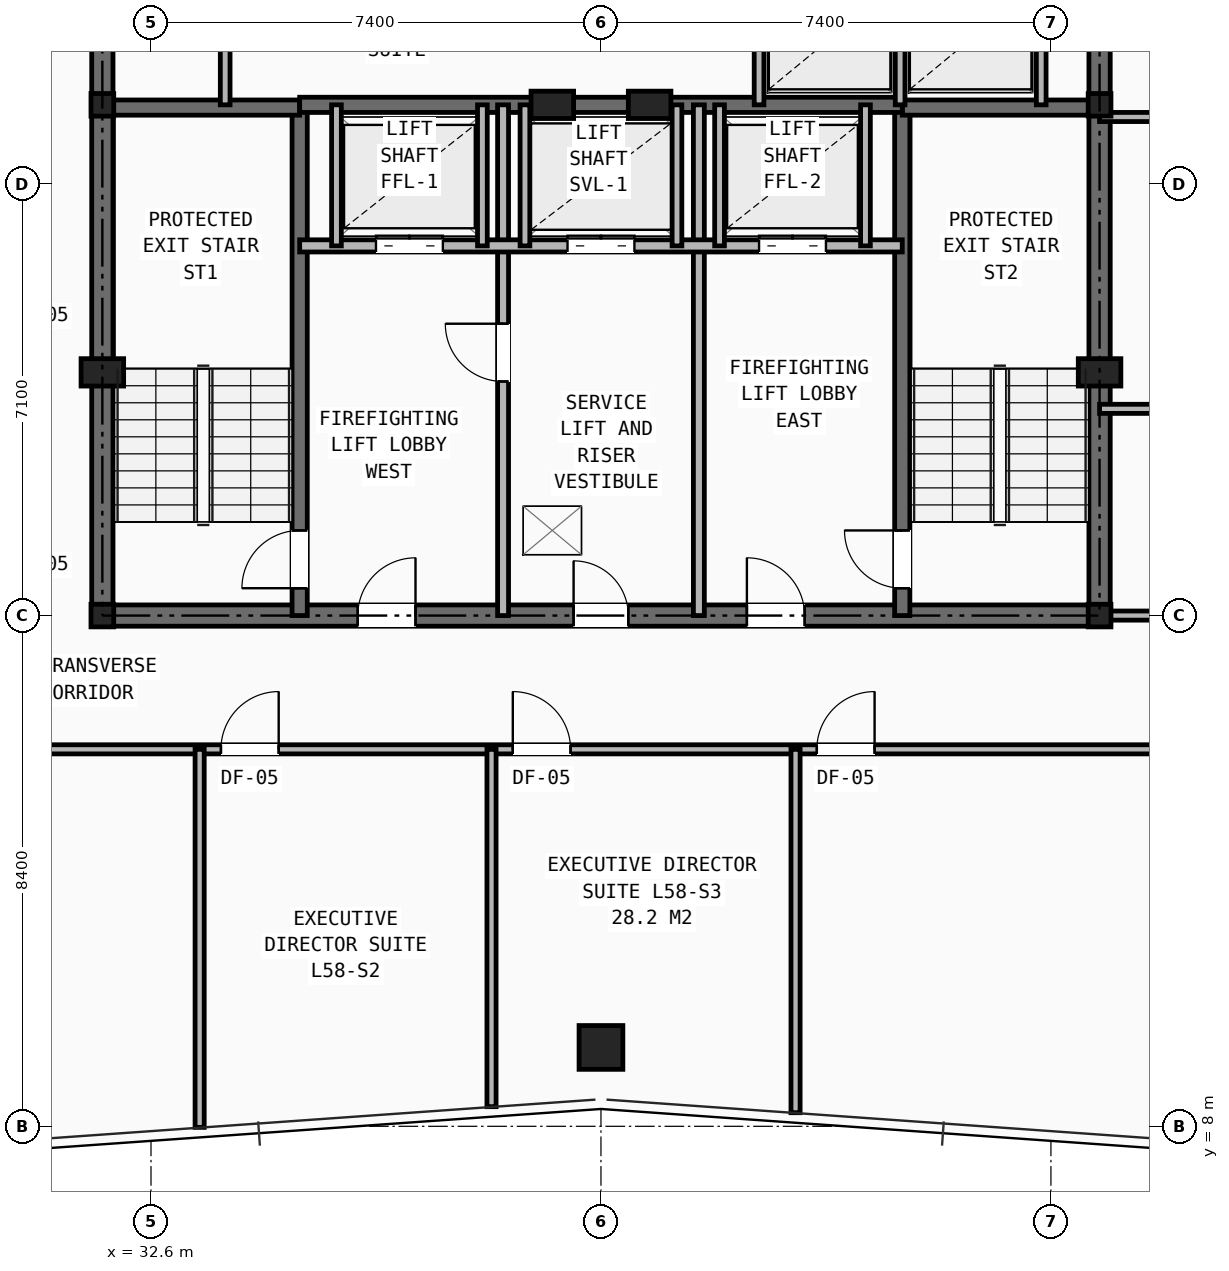
"""IFC4 building model, lengths in metres.
Left out: names, types, materials, properties, quantities, classifications, styles, units other than length and angle.
Written with IfcOpenShell. Run it as: python <this file> out.ifc"""

import sys

from ifc_helpers import new_model, si_unit, direction, frame, frame_2d, origin, origin_2d, place, context, subcontext, project, spatial, rectangle, hollow_rectangle, i_section, extrude, element, fill, save


model = new_model("IFC4")
c1 = context("Model", 3, precision=1e-05, world=origin(), true_north=direction((0.0, 1.0)))
c2 = subcontext(c1, "Body", "Model", "MODEL_VIEW")
j1 = project(units=[si_unit("LENGTHUNIT", "METRE"), si_unit("PLANEANGLEUNIT", "RADIAN")], contexts=[c1])
p1 = place(None, origin())
s1 = spatial("IfcSite", under=j1, at=p1, CompositionType="ELEMENT")
p2 = place(p1, origin())
s2 = spatial("IfcBuilding", under=s1, at=p2, CompositionType="ELEMENT")
p3 = place(p2, frame((0.0, 0.0, 204.9)))
s3 = spatial("IfcBuildingStorey", under=s2, at=p3, CompositionType="ELEMENT", Elevation=204.9)
for number, where, z_axis, x_axis in (
    (1, (31.8, 16.4, 0.0), (0.0, 0.0, 1.0), (1.0, 0.0, 0.0)),
    (2, (48.2, 16.4, 0.0), (0.0, 0.0, 1.0), (1.0, 0.0, 0.0)),
    (3, (31.8, 24.8, 0.0), (0.0, 0.0, 1.0), (1.0, 0.0, 0.0)),
    (4, (48.2, 24.8, 0.0), (0.0, 0.0, 1.0), (1.0, 0.0, 0.0)),
):
    element("IfcColumn", number, at=place(p3, frame(where, z_axis=z_axis, x_axis=x_axis)), inside=s3, PredefinedType="COLUMN", context=c2, shape_type="SweptSolid", body=[
        extrude(i_section(OverallWidth=0.374, OverallDepth=0.372, WebThickness=0.016, FlangeThickness=0.026, at=origin_2d()), origin(), (0.0, 0.0, 1.0), 3.5),
    ])
for number, where, z_axis, x_axis in (
    (5, (31.8, 20.4, 0.0), (0.0, 0.0, 1.0), (1.0, 0.0, 0.0)),
    (6, (48.2, 20.4, 0.0), (0.0, 0.0, 1.0), (1.0, 0.0, 0.0)),
    (7, (39.2, 24.8, 0.0), (0.0, 0.0, 1.0), (1.0, 0.0, 0.0)),
    (8, (40.8, 24.8, 0.0), (0.0, 0.0, 1.0), (1.0, 0.0, 0.0)),
):
    element("IfcColumn", number, at=place(p3, frame(where, z_axis=z_axis, x_axis=x_axis)), inside=s3, PredefinedType="PILASTER", context=c2, shape_type="SweptSolid", body=[
        extrude(rectangle(XDim=0.7, YDim=0.45, at=origin_2d()), origin(), (0.0, 0.0, 1.0), 3.5),
    ])
p4 = place(p3, frame((40.0, 9.297, 0.0), z_axis=(0.0, 0.0, 1.0), x_axis=(1.0, 0.0, 0.0)))
e9 = element("IfcColumn", 9, at=p4, inside=s3, PredefinedType="COLUMN", context=c2, shape_type="SweptSolid", body=[
    extrude(hollow_rectangle(XDim=0.72, YDim=0.72, WallThickness=0.05, at=origin_2d()), origin(), (0.0, 0.0, 1.0), 3.5),
])
p5 = place(p3, frame((31.8, 16.4, 0.0), z_axis=(0.0, 0.0, 1.0), x_axis=(1.0, 0.0, 0.0)))
e10 = element("IfcWall", 10, at=p5, inside=s3, PredefinedType="SHEAR", context=c2, shape_type="SweptSolid", body=[
    extrude(rectangle(XDim=16.4, YDim=0.35, at=frame_2d((8.2, 0.0))), origin(), (0.0, 0.0, 1.0), 3.25),
])
p6 = place(p5, frame((7.75, 0.0, 0.0)))
e11 = element("IfcOpeningElement", 11, at=p6, cuts=e10, PredefinedType="OPENING", context=c2, shape_type="SweptSolid", body=[
    extrude(rectangle(XDim=0.9, YDim=2.1, at=frame_2d((0.45, 1.05))), frame((0.0, 0.185, 0.0), z_axis=(0.0, -1.0, 0.0), x_axis=(1.0, 0.0, 0.0)), (0.0, 0.0, 1.0), 0.37),
])
p7 = place(p5, frame((4.2, 0.0, 0.0)))
e12 = element("IfcOpeningElement", 12, at=p7, cuts=e10, PredefinedType="OPENING", context=c2, shape_type="SweptSolid", body=[
    extrude(rectangle(XDim=0.95, YDim=2.1, at=frame_2d((0.475, 1.05))), frame((0.0, 0.185, 0.0), z_axis=(0.0, -1.0, 0.0), x_axis=(1.0, 0.0, 0.0)), (0.0, 0.0, 1.0), 0.37),
])
p8 = place(p5, frame((10.6, 0.0, 0.0)))
e13 = element("IfcOpeningElement", 13, at=p8, cuts=e10, PredefinedType="OPENING", context=c2, shape_type="SweptSolid", body=[
    extrude(rectangle(XDim=0.95, YDim=2.1, at=frame_2d((0.475, 1.05))), frame((0.0, 0.185, 0.0), z_axis=(0.0, -1.0, 0.0), x_axis=(1.0, 0.0, 0.0)), (0.0, 0.0, 1.0), 0.37),
])
p9 = place(p3, frame((31.8, 16.4, 0.0), z_axis=(0.0, 0.0, 1.0), x_axis=(0.0, 1.0, 0.0)))
e14 = element("IfcWall", 14, at=p9, inside=s3, PredefinedType="SHEAR", context=c2, shape_type="SweptSolid", body=[
    extrude(rectangle(XDim=14.8, YDim=0.35, at=frame_2d((7.4, 0.0))), origin(), (0.0, 0.0, 1.0), 3.25),
])
p10 = place(p9, frame((11.0, 0.0, 0.0)))
e15 = element("IfcOpeningElement", 15, at=p10, cuts=e14, PredefinedType="OPENING", context=c2, shape_type="SweptSolid", body=[
    extrude(rectangle(XDim=1.1, YDim=2.15, at=frame_2d((0.55, 1.075))), frame((0.0, 0.185, 0.0), z_axis=(0.0, -1.0, 0.0), x_axis=(1.0, 0.0, 0.0)), (0.0, 0.0, 1.0), 0.37),
])
p11 = place(p3, frame((48.2, 16.4, 0.0), z_axis=(0.0, 0.0, 1.0), x_axis=(0.0, 1.0, 0.0)))
e16 = element("IfcWall", 16, at=p11, inside=s3, PredefinedType="SHEAR", context=c2, shape_type="SweptSolid", body=[
    extrude(rectangle(XDim=14.8, YDim=0.35, at=frame_2d((7.4, 0.0))), origin(), (0.0, 0.0, 1.0), 3.25),
])
p12 = place(p11, frame((11.0, 0.0, 0.0)))
e17 = element("IfcOpeningElement", 17, at=p12, cuts=e16, PredefinedType="OPENING", context=c2, shape_type="SweptSolid", body=[
    extrude(rectangle(XDim=1.1, YDim=2.15, at=frame_2d((0.55, 1.075))), frame((0.0, 0.185, 0.0), z_axis=(0.0, -1.0, 0.0), x_axis=(1.0, 0.0, 0.0)), (0.0, 0.0, 1.0), 0.37),
])
p13 = place(p3, frame((35.045, 16.4, 0.0), z_axis=(0.0, 0.0, 1.0), x_axis=(0.0, 1.0, 0.0)))
e18 = element("IfcWall", 18, at=p13, inside=s3, PredefinedType="SHEAR", context=c2, shape_type="SweptSolid", body=[
    extrude(rectangle(XDim=8.4, YDim=0.25, at=frame_2d((4.2, 0.0))), origin(), (0.0, 0.0, 1.0), 3.25),
])
p14 = place(p13, frame((0.45, 0.0, 0.0)))
e19 = element("IfcOpeningElement", 19, at=p14, cuts=e18, PredefinedType="OPENING", context=c2, shape_type="SweptSolid", body=[
    extrude(rectangle(XDim=0.95, YDim=2.1, at=frame_2d((0.475, 1.05))), frame((0.0, 0.135, 0.0), z_axis=(0.0, -1.0, 0.0), x_axis=(1.0, 0.0, 0.0)), (0.0, 0.0, 1.0), 0.27),
])
p15 = place(p3, frame((31.8, 24.755, 0.0), z_axis=(0.0, 0.0, 1.0), x_axis=(1.0, 0.0, 0.0)))
e20 = element("IfcWall", 20, at=p15, inside=s3, PredefinedType="SHEAR", context=c2, shape_type="SweptSolid", body=[
    extrude(rectangle(XDim=3.245, YDim=0.25, at=frame_2d((1.623, 0.0))), origin(), (0.0, 0.0, 1.0), 3.25),
])
p16 = place(p3, frame((44.955, 16.4, 0.0), z_axis=(0.0, 0.0, 1.0), x_axis=(0.0, 1.0, 0.0)))
e21 = element("IfcWall", 21, at=p16, inside=s3, PredefinedType="SHEAR", context=c2, shape_type="SweptSolid", body=[
    extrude(rectangle(XDim=8.4, YDim=0.25, at=frame_2d((4.2, 0.0))), origin(), (0.0, 0.0, 1.0), 3.25),
])
p17 = place(p16, frame((0.45, 0.0, 0.0)))
e22 = element("IfcOpeningElement", 22, at=p17, cuts=e21, PredefinedType="OPENING", context=c2, shape_type="SweptSolid", body=[
    extrude(rectangle(XDim=0.95, YDim=2.1, at=frame_2d((0.475, 1.05))), frame((0.0, 0.135, 0.0), z_axis=(0.0, -1.0, 0.0), x_axis=(1.0, 0.0, 0.0)), (0.0, 0.0, 1.0), 0.27),
])
p18 = place(p3, frame((44.955, 24.755, 0.0), z_axis=(0.0, 0.0, 1.0), x_axis=(1.0, 0.0, 0.0)))
e23 = element("IfcWall", 23, at=p18, inside=s3, PredefinedType="SHEAR", context=c2, shape_type="SweptSolid", body=[
    extrude(rectangle(XDim=3.245, YDim=0.25, at=frame_2d((1.623, 0.0))), origin(), (0.0, 0.0, 1.0), 3.25),
])
p19 = place(p3, frame((35.045, 24.8, 0.0), z_axis=(0.0, 0.0, 1.0), x_axis=(1.0, 0.0, 0.0)))
e24 = element("IfcWall", 24, at=p19, inside=s3, PredefinedType="SHEAR", context=c2, shape_type="SweptSolid", body=[
    extrude(rectangle(XDim=9.91, YDim=0.25, at=frame_2d((4.955, 0.0))), origin(), (0.0, 0.0, 1.0), 3.25),
])
p20 = place(p3, frame((38.39, 16.4, 0.0), z_axis=(0.0, 0.0, 1.0), x_axis=(0.0, 1.0, 0.0)))
e25 = element("IfcWall", 25, at=p20, inside=s3, PredefinedType="PARTITIONING", context=c2, shape_type="SweptSolid", body=[
    extrude(rectangle(XDim=8.4, YDim=0.18, at=frame_2d((4.2, 0.0))), origin(), (0.0, 0.0, 1.0), 2.705),
])
p21 = place(p20, frame((3.85, 0.0, 0.0)))
e26 = element("IfcOpeningElement", 26, at=p21, cuts=e25, PredefinedType="OPENING", context=c2, shape_type="SweptSolid", body=[
    extrude(rectangle(XDim=0.95, YDim=2.1, at=frame_2d((0.475, 1.05))), frame((0.0, 0.1, 0.0), z_axis=(0.0, -1.0, 0.0), x_axis=(1.0, 0.0, 0.0)), (0.0, 0.0, 1.0), 0.2),
])
p22 = place(p3, frame((41.61, 16.4, 0.0), z_axis=(0.0, 0.0, 1.0), x_axis=(0.0, 1.0, 0.0)))
e27 = element("IfcWall", 27, at=p22, inside=s3, PredefinedType="PARTITIONING", context=c2, shape_type="SweptSolid", body=[
    extrude(rectangle(XDim=8.4, YDim=0.18, at=frame_2d((4.2, 0.0))), origin(), (0.0, 0.0, 1.0), 2.705),
])
p23 = place(p3, frame((35.045, 22.48, 0.0), z_axis=(0.0, 0.0, 1.0), x_axis=(1.0, 0.0, 0.0)))
e28 = element("IfcWall", 28, at=p23, inside=s3, PredefinedType="SOLIDWALL", context=c2, shape_type="SweptSolid", body=[
    extrude(rectangle(XDim=9.91, YDim=0.2, at=frame_2d((4.955, 0.0))), origin(), (0.0, 0.0, 1.0), 3.25),
])
p24 = place(p23, frame((1.255, 0.0, 0.0)))
e29 = element("IfcOpeningElement", 29, at=p24, cuts=e28, PredefinedType="OPENING", context=c2, shape_type="SweptSolid", body=[
    extrude(rectangle(XDim=1.1, YDim=2.15, at=frame_2d((0.55, 1.075))), frame((0.0, 0.11, 0.0), z_axis=(0.0, -1.0, 0.0), x_axis=(1.0, 0.0, 0.0)), (0.0, 0.0, 1.0), 0.22),
])
p25 = place(p23, frame((7.555, 0.0, 0.0)))
e30 = element("IfcOpeningElement", 30, at=p25, cuts=e28, PredefinedType="OPENING", context=c2, shape_type="SweptSolid", body=[
    extrude(rectangle(XDim=1.1, YDim=2.15, at=frame_2d((0.55, 1.075))), frame((0.0, 0.11, 0.0), z_axis=(0.0, -1.0, 0.0), x_axis=(1.0, 0.0, 0.0)), (0.0, 0.0, 1.0), 0.22),
])
p26 = place(p23, frame((4.405, 0.0, 0.0)))
e31 = element("IfcOpeningElement", 31, at=p26, cuts=e28, PredefinedType="OPENING", context=c2, shape_type="SweptSolid", body=[
    extrude(rectangle(XDim=1.1, YDim=2.15, at=frame_2d((0.55, 1.075))), frame((0.0, 0.11, 0.0), z_axis=(0.0, -1.0, 0.0), x_axis=(1.0, 0.0, 0.0)), (0.0, 0.0, 1.0), 0.22),
])
for number, where, z_axis, x_axis in (
    (32, (35.65, 22.48, 0.0), (0.0, 0.0, 1.0), (0.0, 1.0, 0.0)),
    (33, (38.05, 22.48, 0.0), (0.0, 0.0, 1.0), (0.0, 1.0, 0.0)),
    (34, (41.95, 22.48, 0.0), (0.0, 0.0, 1.0), (0.0, 1.0, 0.0)),
    (35, (44.35, 22.48, 0.0), (0.0, 0.0, 1.0), (0.0, 1.0, 0.0)),
    (36, (38.75, 22.48, 0.0), (0.0, 0.0, 1.0), (0.0, 1.0, 0.0)),
    (37, (41.25, 22.48, 0.0), (0.0, 0.0, 1.0), (0.0, 1.0, 0.0)),
):
    element("IfcWall", number, at=place(p3, frame(where, z_axis=z_axis, x_axis=x_axis)), inside=s3, PredefinedType="SOLIDWALL", context=c2, shape_type="SweptSolid", body=[
        extrude(rectangle(XDim=2.32, YDim=0.16, at=frame_2d((1.16, 0.0))), origin(), (0.0, 0.0, 1.0), 3.25),
    ])
for number, where, z_axis, x_axis in (
    (38, (33.82, 24.8, 0.0), (0.0, 0.0, 1.0), (0.0, 1.0, 0.0)),
    (39, (42.6, 24.8, 0.0), (0.0, 0.0, 1.0), (0.0, 1.0, 0.0)),
    (40, (44.92, 24.8, 0.0), (0.0, 0.0, 1.0), (0.0, 1.0, 0.0)),
    (41, (47.24, 24.8, 0.0), (0.0, 0.0, 1.0), (0.0, 1.0, 0.0)),
):
    element("IfcWall", number, at=place(p3, frame(where, z_axis=z_axis, x_axis=x_axis)), inside=s3, PredefinedType="SOLIDWALL", context=c2, shape_type="SweptSolid", body=[
        extrude(rectangle(XDim=2.08, YDim=0.16, at=frame_2d((1.04, 0.0))), origin(), (0.0, 0.0, 1.0), 3.25),
    ])
p27 = place(p3, frame((48.2, 16.4, 0.0), z_axis=(0.0, 0.0, 1.0), x_axis=(1.0, 0.0, 0.0)))
e42 = element("IfcWall", 42, at=p27, inside=s3, PredefinedType="PARTITIONING", context=c2, shape_type="SweptSolid", body=[
    extrude(rectangle(XDim=16.034, YDim=0.15, at=frame_2d((8.017, 0.0))), origin(), (0.0, 0.0, 1.0), 2.292),
])
p28 = place(p3, frame((25.5, 14.2, 0.0), z_axis=(0.0, 0.0, 1.0), x_axis=(1.0, 0.0, 0.0)))
e43 = element("IfcWall", 43, at=p28, inside=s3, PredefinedType="PARTITIONING", context=c2, shape_type="SweptSolid", body=[
    extrude(rectangle(XDim=29.0, YDim=0.15, at=frame_2d((14.5, 0.0))), origin(), (0.0, 0.0, 1.0), 2.292),
])
p29 = place(p28, frame((0.85, 0.0, 0.0)))
e44 = element("IfcOpeningElement", 44, at=p29, cuts=e43, PredefinedType="OPENING", context=c2, shape_type="SweptSolid", body=[
    extrude(rectangle(XDim=0.95, YDim=2.1, at=frame_2d((0.475, 1.05))), frame((0.0, 0.085, 0.0), z_axis=(0.0, -1.0, 0.0), x_axis=(1.0, 0.0, 0.0)), (0.0, 0.0, 1.0), 0.17),
])
p30 = place(p28, frame((8.25, 0.0, 0.0)))
e45 = element("IfcOpeningElement", 45, at=p30, cuts=e43, PredefinedType="OPENING", context=c2, shape_type="SweptSolid", body=[
    extrude(rectangle(XDim=0.95, YDim=2.1, at=frame_2d((0.475, 1.05))), frame((0.0, 0.085, 0.0), z_axis=(0.0, -1.0, 0.0), x_axis=(1.0, 0.0, 0.0)), (0.0, 0.0, 1.0), 0.17),
])
p31 = place(p28, frame((13.05, 0.0, 0.0)))
e46 = element("IfcOpeningElement", 46, at=p31, cuts=e43, PredefinedType="OPENING", context=c2, shape_type="SweptSolid", body=[
    extrude(rectangle(XDim=0.95, YDim=2.1, at=frame_2d((0.475, 1.05))), frame((0.0, 0.085, 0.0), z_axis=(0.0, -1.0, 0.0), x_axis=(1.0, 0.0, 0.0)), (0.0, 0.0, 1.0), 0.17),
])
p32 = place(p28, frame((18.05, 0.0, 0.0)))
e47 = element("IfcOpeningElement", 47, at=p32, cuts=e43, PredefinedType="OPENING", context=c2, shape_type="SweptSolid", body=[
    extrude(rectangle(XDim=0.95, YDim=2.1, at=frame_2d((0.475, 1.05))), frame((0.0, 0.085, 0.0), z_axis=(0.0, -1.0, 0.0), x_axis=(1.0, 0.0, 0.0)), (0.0, 0.0, 1.0), 0.17),
])
p33 = place(p3, frame((33.4, 7.982, 0.0), z_axis=(0.0, 0.0, 1.0), x_axis=(0.0, 1.0, 0.0)))
e48 = element("IfcWall", 48, at=p33, inside=s3, PredefinedType="PARTITIONING", context=c2, shape_type="SweptSolid", body=[
    extrude(rectangle(XDim=6.218, YDim=0.15, at=frame_2d((3.109, 0.0))), origin(), (0.0, 0.0, 1.0), 2.628),
])
p34 = place(p3, frame((38.2, 8.323, 0.0), z_axis=(0.0, 0.0, 1.0), x_axis=(0.0, 1.0, 0.0)))
e49 = element("IfcWall", 49, at=p34, inside=s3, PredefinedType="PARTITIONING", context=c2, shape_type="SweptSolid", body=[
    extrude(rectangle(XDim=5.877, YDim=0.15, at=frame_2d((2.938, 0.0))), origin(), (0.0, 0.0, 1.0), 2.292),
])
p35 = place(p3, frame((43.2, 8.224, 0.0), z_axis=(0.0, 0.0, 1.0), x_axis=(0.0, 1.0, 0.0)))
e50 = element("IfcWall", 50, at=p35, inside=s3, PredefinedType="PARTITIONING", context=c2, shape_type="SweptSolid", body=[
    extrude(rectangle(XDim=5.976, YDim=0.15, at=frame_2d((2.988, 0.0))), origin(), (0.0, 0.0, 1.0), 2.628),
])
p36 = place(p3, frame((48.2, 19.8, 0.0), z_axis=(0.0, 0.0, 1.0), x_axis=(1.0, 0.0, 0.0)))
e51 = element("IfcWall", 51, at=p36, inside=s3, PredefinedType="PARTITIONING", context=c2, shape_type="SweptSolid", body=[
    extrude(rectangle(XDim=13.736, YDim=0.15, at=frame_2d((6.868, 0.0))), origin(), (0.0, 0.0, 1.0), 2.292),
])
p37 = place(p36, frame((1.4, 0.0, 0.0)))
e52 = element("IfcOpeningElement", 52, at=p37, cuts=e51, PredefinedType="OPENING", context=c2, shape_type="SweptSolid", body=[
    extrude(rectangle(XDim=0.95, YDim=2.1, at=frame_2d((0.475, 1.05))), frame((0.0, 0.085, 0.0), z_axis=(0.0, -1.0, 0.0), x_axis=(1.0, 0.0, 0.0)), (0.0, 0.0, 1.0), 0.17),
])
p38 = place(p3, frame((48.2, 24.6, 0.0), z_axis=(0.0, 0.0, 1.0), x_axis=(1.0, 0.0, 0.0)))
e53 = element("IfcWall", 53, at=p38, inside=s3, PredefinedType="PARTITIONING", context=c2, shape_type="SweptSolid", body=[
    extrude(rectangle(XDim=10.492, YDim=0.15, at=frame_2d((5.246, 0.0))), origin(), (0.0, 0.0, 1.0), 2.628),
])
p39 = place(p38, frame((1.4, 0.0, 0.0)))
e54 = element("IfcOpeningElement", 54, at=p39, cuts=e53, PredefinedType="OPENING", context=c2, shape_type="SweptSolid", body=[
    extrude(rectangle(XDim=0.95, YDim=2.1, at=frame_2d((0.475, 1.05))), frame((0.0, 0.085, 0.0), z_axis=(0.0, -1.0, 0.0), x_axis=(1.0, 0.0, 0.0)), (0.0, 0.0, 1.0), 0.17),
])
p40 = place(p6, origin())
e55 = element("IfcDoor", 55, at=p40, inside=s3, OperationType="SINGLE_SWING_LEFT", PredefinedType="DOOR", context=c2, shape_type="SweptSolid", body=[
    extrude(rectangle(XDim=0.9, YDim=2.1, at=frame_2d((0.45, 1.05))), frame((0.0, 0.025, 0.0), z_axis=(0.0, -1.0, 0.0), x_axis=(1.0, 0.0, 0.0)), (0.0, 0.0, 1.0), 0.05),
])
fill(e11, e55)
p41 = place(p21, origin())
e56 = element("IfcDoor", 56, at=p41, inside=s3, OperationType="SINGLE_SWING_RIGHT", PredefinedType="DOOR", context=c2, shape_type="SweptSolid", body=[
    extrude(rectangle(XDim=0.95, YDim=2.1, at=frame_2d((0.475, 1.05))), frame((0.0, 0.025, 0.0), z_axis=(0.0, -1.0, 0.0), x_axis=(1.0, 0.0, 0.0)), (0.0, 0.0, 1.0), 0.05),
])
fill(e26, e56)
p42 = place(p14, origin())
e57 = element("IfcDoor", 57, at=p42, inside=s3, OperationType="SINGLE_SWING_LEFT", PredefinedType="DOOR", context=c2, shape_type="SweptSolid", body=[
    extrude(rectangle(XDim=0.95, YDim=2.1, at=frame_2d((0.475, 1.05))), frame((0.0, 0.025, 0.0), z_axis=(0.0, -1.0, 0.0), x_axis=(1.0, 0.0, 0.0)), (0.0, 0.0, 1.0), 0.05),
])
fill(e19, e57)
p43 = place(p17, origin())
e58 = element("IfcDoor", 58, at=p43, inside=s3, OperationType="SINGLE_SWING_RIGHT", PredefinedType="DOOR", context=c2, shape_type="SweptSolid", body=[
    extrude(rectangle(XDim=0.95, YDim=2.1, at=frame_2d((0.475, 1.05))), frame((0.0, 0.025, 0.0), z_axis=(0.0, -1.0, 0.0), x_axis=(1.0, 0.0, 0.0)), (0.0, 0.0, 1.0), 0.05),
])
fill(e22, e58)
p44 = place(p7, origin())
e59 = element("IfcDoor", 59, at=p44, inside=s3, OperationType="SINGLE_SWING_RIGHT", PredefinedType="DOOR", context=c2, shape_type="SweptSolid", body=[
    extrude(rectangle(XDim=0.95, YDim=2.1, at=frame_2d((0.475, 1.05))), frame((0.0, 0.025, 0.0), z_axis=(0.0, -1.0, 0.0), x_axis=(1.0, 0.0, 0.0)), (0.0, 0.0, 1.0), 0.05),
])
fill(e12, e59)
p45 = place(p8, origin())
e60 = element("IfcDoor", 60, at=p45, inside=s3, OperationType="SINGLE_SWING_LEFT", PredefinedType="DOOR", context=c2, shape_type="SweptSolid", body=[
    extrude(rectangle(XDim=0.95, YDim=2.1, at=frame_2d((0.475, 1.05))), frame((0.0, 0.025, 0.0), z_axis=(0.0, -1.0, 0.0), x_axis=(1.0, 0.0, 0.0)), (0.0, 0.0, 1.0), 0.05),
])
fill(e13, e60)
p46 = place(p24, origin())
e61 = element("IfcDoor", 61, at=p46, inside=s3, OperationType="DOUBLE_DOOR_SLIDING", PredefinedType="DOOR", context=c2, shape_type="SweptSolid", body=[
    extrude(rectangle(XDim=1.1, YDim=2.15, at=frame_2d((0.55, 1.075))), frame((0.0, 0.025, 0.0), z_axis=(0.0, -1.0, 0.0), x_axis=(1.0, 0.0, 0.0)), (0.0, 0.0, 1.0), 0.05),
])
fill(e29, e61)
p47 = place(p25, origin())
e62 = element("IfcDoor", 62, at=p47, inside=s3, OperationType="DOUBLE_DOOR_SLIDING", PredefinedType="DOOR", context=c2, shape_type="SweptSolid", body=[
    extrude(rectangle(XDim=1.1, YDim=2.15, at=frame_2d((0.55, 1.075))), frame((0.0, 0.025, 0.0), z_axis=(0.0, -1.0, 0.0), x_axis=(1.0, 0.0, 0.0)), (0.0, 0.0, 1.0), 0.05),
])
fill(e30, e62)
p48 = place(p26, origin())
e63 = element("IfcDoor", 63, at=p48, inside=s3, OperationType="DOUBLE_DOOR_SLIDING", PredefinedType="DOOR", context=c2, shape_type="SweptSolid", body=[
    extrude(rectangle(XDim=1.1, YDim=2.15, at=frame_2d((0.55, 1.075))), frame((0.0, 0.025, 0.0), z_axis=(0.0, -1.0, 0.0), x_axis=(1.0, 0.0, 0.0)), (0.0, 0.0, 1.0), 0.05),
])
fill(e31, e63)
p49 = place(p30, origin())
e64 = element("IfcDoor", 64, at=p49, inside=s3, OperationType="SINGLE_SWING_RIGHT", PredefinedType="DOOR", context=c2, shape_type="SweptSolid", body=[
    extrude(rectangle(XDim=0.95, YDim=2.1, at=frame_2d((0.475, 1.05))), frame((0.0, 0.025, 0.0), z_axis=(0.0, -1.0, 0.0), x_axis=(1.0, 0.0, 0.0)), (0.0, 0.0, 1.0), 0.05),
])
fill(e45, e64)
p50 = place(p31, origin())
e65 = element("IfcDoor", 65, at=p50, inside=s3, OperationType="SINGLE_SWING_LEFT", PredefinedType="DOOR", context=c2, shape_type="SweptSolid", body=[
    extrude(rectangle(XDim=0.95, YDim=2.1, at=frame_2d((0.475, 1.05))), frame((0.0, 0.025, 0.0), z_axis=(0.0, -1.0, 0.0), x_axis=(1.0, 0.0, 0.0)), (0.0, 0.0, 1.0), 0.05),
])
fill(e46, e65)
p51 = place(p32, origin())
e66 = element("IfcDoor", 66, at=p51, inside=s3, OperationType="SINGLE_SWING_RIGHT", PredefinedType="DOOR", context=c2, shape_type="SweptSolid", body=[
    extrude(rectangle(XDim=0.95, YDim=2.1, at=frame_2d((0.475, 1.05))), frame((0.0, 0.025, 0.0), z_axis=(0.0, -1.0, 0.0), x_axis=(1.0, 0.0, 0.0)), (0.0, 0.0, 1.0), 0.05),
])
fill(e47, e66)
save(model, sys.argv[1])
